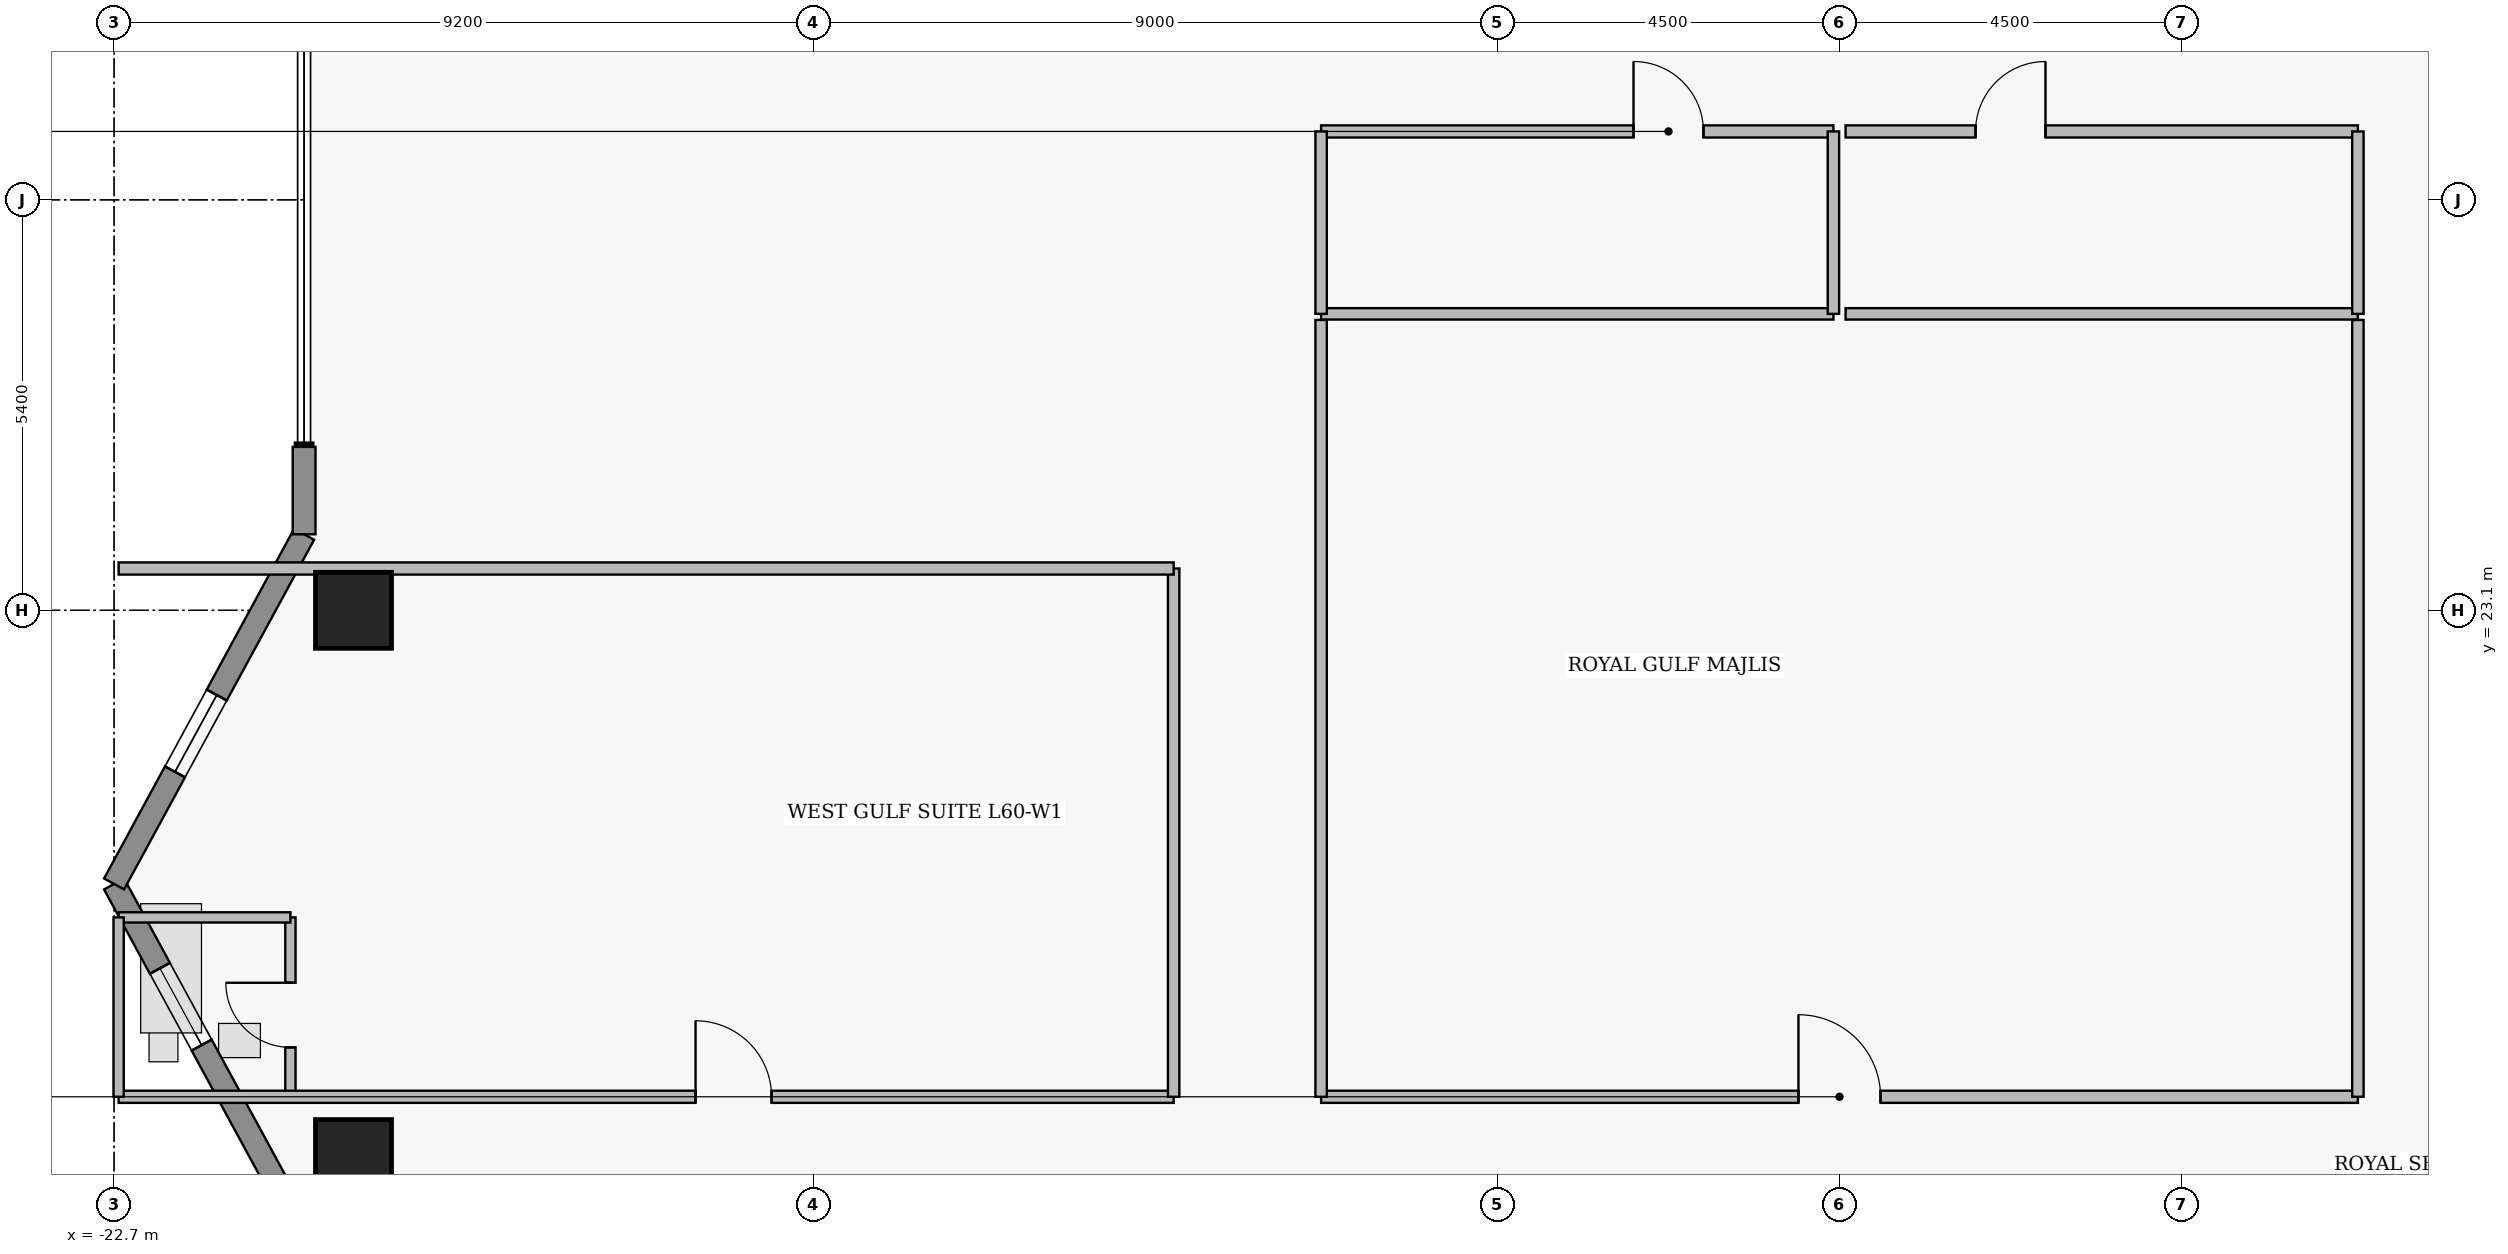
"""IFC4 building model, lengths in metres.
Left out: names, types, materials, properties, quantities, classifications, styles, units other than length and angle.
Written with IfcOpenShell. Run it as: python <this file> out.ifc"""

import sys

from ifc_helpers import new_model, si_unit, direction, frame, frame_2d, origin, origin_2d, place, context, subcontext, project, spatial, rectangle, extrude, element, fill, save


model = new_model("IFC4")
c1 = context("Model", 3, precision=1e-05, world=origin(), true_north=direction((0.0, 1.0)))
c2 = subcontext(c1, "Body", "Model", "MODEL_VIEW")
j1 = project(units=[si_unit("LENGTHUNIT", "METRE"), si_unit("PLANEANGLEUNIT", "RADIAN")], contexts=[c1])
p1 = place(None, origin())
s1 = spatial("IfcSite", under=j1, at=p1, CompositionType="ELEMENT")
p2 = place(p1, origin())
s2 = spatial("IfcBuilding", under=s1, at=p2, CompositionType="ELEMENT")
p3 = place(p2, frame((0.0, 0.0, 239.65)))
s3 = spatial("IfcBuildingStorey", under=s2, at=p3, CompositionType="ELEMENT", Elevation=239.65)
for number, where, z_axis, x_axis in (
    (1, (-19.55, 15.9, 0.43), (0.0, 0.0, 1.0), (1.0, 0.0, 0.0)),
    (2, (-19.55, 23.1, 0.43), (0.0, 0.0, 1.0), (1.0, 0.0, 0.0)),
):
    element("IfcColumn", number, at=place(p3, frame(where, z_axis=z_axis, x_axis=x_axis)), inside=s3, PredefinedType="COLUMN", context=c2, shape_type="SweptSolid", body=[
        extrude(rectangle(XDim=1.0, YDim=1.0, at=origin_2d()), origin(), (0.0, 0.0, 1.0), 3.27),
    ])
p4 = place(p3, frame((-20.2, 14.9, 0.0), z_axis=(0.0, 0.0, 1.0), x_axis=(-0.477505494629, 0.878628762675, 0.0)))
e3 = element("IfcWall", 3, at=p4, inside=s3, PredefinedType="STANDARD", context=c2, shape_type="SweptSolid", body=[
    extrude(rectangle(XDim=5.236, YDim=0.3, at=frame_2d((2.618, 0.0))), origin(), (0.0, 0.0, 1.0), 3.48),
])
p5 = place(p4, frame((2.823, 0.0, 1.25)))
e4 = element("IfcOpeningElement", 4, at=p5, cuts=e3, PredefinedType="OPENING", context=c2, shape_type="SweptSolid", body=[
    extrude(rectangle(XDim=1.15, YDim=1.55, at=frame_2d((0.575, 0.775))), frame((0.0, 0.16, 0.0), z_axis=(0.0, -1.0, 0.0), x_axis=(1.0, 0.0, 0.0)), (0.0, 0.0, 1.0), 0.32),
])
p6 = place(p3, frame((-22.7, 19.5, 0.0), z_axis=(0.0, 0.0, 1.0), x_axis=(0.477505494629, 0.878628762675, 0.0)))
e5 = element("IfcWall", 5, at=p6, inside=s3, PredefinedType="STANDARD", context=c2, shape_type="SweptSolid", body=[
    extrude(rectangle(XDim=5.236, YDim=0.3, at=frame_2d((2.618, 0.0))), origin(), (0.0, 0.0, 1.0), 3.48),
])
p7 = place(p6, frame((1.679, 0.0, 1.25)))
e6 = element("IfcOpeningElement", 6, at=p7, cuts=e5, PredefinedType="OPENING", context=c2, shape_type="SweptSolid", body=[
    extrude(rectangle(XDim=1.15, YDim=1.55, at=frame_2d((0.575, 0.775))), frame((0.0, 0.16, 0.0), z_axis=(0.0, -1.0, 0.0), x_axis=(1.0, 0.0, 0.0)), (0.0, 0.0, 1.0), 0.32),
])
p8 = place(p3, frame((-20.2, 24.1, 0.0), z_axis=(0.0, 0.0, 1.0), x_axis=(0.0, 1.0, 0.0)))
e7 = element("IfcWall", 7, at=p8, inside=s3, PredefinedType="STANDARD", context=c2, shape_type="SweptSolid", body=[
    extrude(rectangle(XDim=1.15, YDim=0.3, at=frame_2d((0.575, 0.0))), origin(), (0.0, 0.0, 1.0), 3.48),
])
p9 = place(p3, frame((-6.82, 29.4, 0.0), z_axis=(0.0, 0.0, 1.0), x_axis=(1.0, 0.0, 0.0)))
e8 = element("IfcWall", 8, at=p9, inside=s3, PredefinedType="PARTITIONING", context=c2, shape_type="SweptSolid", body=[
    extrude(rectangle(XDim=6.74, YDim=0.16, at=frame_2d((3.37, 0.0))), origin(), (0.0, 0.0, 1.0), 3.48),
])
p10 = place(p9, frame((4.11, 0.0, 0.0)))
e9 = element("IfcOpeningElement", 9, at=p10, cuts=e8, PredefinedType="OPENING", context=c2, shape_type="SweptSolid", body=[
    extrude(rectangle(XDim=0.92, YDim=2.12, at=frame_2d((0.46, 1.06))), frame((0.0, 0.09, 0.0), z_axis=(0.0, -1.0, 0.0), x_axis=(1.0, 0.0, 0.0)), (0.0, 0.0, 1.0), 0.18),
])
p11 = place(p3, frame((0.08, 29.4, 0.0), z_axis=(0.0, 0.0, 1.0), x_axis=(1.0, 0.0, 0.0)))
e10 = element("IfcWall", 10, at=p11, inside=s3, PredefinedType="PARTITIONING", context=c2, shape_type="SweptSolid", body=[
    extrude(rectangle(XDim=6.74, YDim=0.16, at=frame_2d((3.37, 0.0))), origin(), (0.0, 0.0, 1.0), 3.48),
])
p12 = place(p11, frame((1.71, 0.0, 0.0)))
e11 = element("IfcOpeningElement", 11, at=p12, cuts=e10, PredefinedType="OPENING", context=c2, shape_type="SweptSolid", body=[
    extrude(rectangle(XDim=0.92, YDim=2.12, at=frame_2d((0.46, 1.06))), frame((0.0, 0.09, 0.0), z_axis=(0.0, -1.0, 0.0), x_axis=(1.0, 0.0, 0.0)), (0.0, 0.0, 1.0), 0.18),
])
p13 = place(p3, frame((-6.82, 16.7, 0.0), z_axis=(0.0, 0.0, 1.0), x_axis=(1.0, 0.0, 0.0)))
e12 = element("IfcWall", 12, at=p13, inside=s3, PredefinedType="PARTITIONING", context=c2, shape_type="SweptSolid", body=[
    extrude(rectangle(XDim=13.64, YDim=0.16, at=frame_2d((6.82, 0.0))), origin(), (0.0, 0.0, 1.0), 3.076),
])
p14 = place(p13, frame((6.28, 0.0, 0.0)))
e13 = element("IfcOpeningElement", 13, at=p14, cuts=e12, PredefinedType="OPENING", context=c2, shape_type="SweptSolid", body=[
    extrude(rectangle(XDim=1.08, YDim=2.18, at=frame_2d((0.54, 1.09))), frame((0.0, 0.09, 0.0), z_axis=(0.0, -1.0, 0.0), x_axis=(1.0, 0.0, 0.0)), (0.0, 0.0, 1.0), 0.18),
])
p15 = place(p3, frame((-20.38, 16.7, 0.0), z_axis=(0.0, 0.0, 1.0), x_axis=(0.0, 1.0, 0.0)))
e14 = element("IfcWall", 14, at=p15, inside=s3, PredefinedType="PLUMBINGWALL", context=c2, shape_type="SweptSolid", body=[
    extrude(rectangle(XDim=2.36, YDim=0.135, at=frame_2d((1.18, 0.0))), origin(), (0.0, 0.0, 1.0), 3.48),
])
p16 = place(p15, frame((0.65, 0.0, 0.0)))
e15 = element("IfcOpeningElement", 15, at=p16, cuts=e14, PredefinedType="OPENING", context=c2, shape_type="SweptSolid", body=[
    extrude(rectangle(XDim=0.85, YDim=2.1, at=frame_2d((0.425, 1.05))), frame((0.0, 0.077, 0.0), z_axis=(0.0, -1.0, 0.0), x_axis=(1.0, 0.0, 0.0)), (0.0, 0.0, 1.0), 0.155),
])
p17 = place(p3, frame((-22.64, 16.7, 0.0), z_axis=(0.0, 0.0, 1.0), x_axis=(1.0, 0.0, 0.0)))
e16 = element("IfcWall", 16, at=p17, inside=s3, PredefinedType="PARTITIONING", context=c2, shape_type="SweptSolid", body=[
    extrude(rectangle(XDim=13.88, YDim=0.16, at=frame_2d((6.94, 0.0))), origin(), (0.0, 0.0, 1.0), 3.076),
])
p18 = place(p17, frame((7.59, 0.0, 0.0)))
e17 = element("IfcOpeningElement", 17, at=p18, cuts=e16, PredefinedType="OPENING", context=c2, shape_type="SweptSolid", body=[
    extrude(rectangle(XDim=1.0, YDim=2.15, at=frame_2d((0.5, 1.075))), frame((0.0, 0.09, 0.0), z_axis=(0.0, -1.0, 0.0), x_axis=(1.0, 0.0, 0.0)), (0.0, 0.0, 1.0), 0.18),
])
p19 = place(p3, frame((-6.82, 27.0, 0.0), z_axis=(0.0, 0.0, 1.0), x_axis=(1.0, 0.0, 0.0)))
e18 = element("IfcWall", 18, at=p19, inside=s3, PredefinedType="PARTITIONING", context=c2, shape_type="SweptSolid", body=[
    extrude(rectangle(XDim=6.74, YDim=0.15, at=frame_2d((3.37, 0.0))), origin(), (0.0, 0.0, 1.0), 3.48),
])
for number, where, z_axis, x_axis in (
    (19, (-6.82, 27.0, 0.0), (0.0, 0.0, 1.0), (0.0, 1.0, 0.0)),
    (20, (-0.08, 27.0, 0.0), (0.0, 0.0, 1.0), (0.0, 1.0, 0.0)),
):
    element("IfcWall", number, at=place(p3, frame(where, z_axis=z_axis, x_axis=x_axis)), inside=s3, PredefinedType="PARTITIONING", context=c2, shape_type="SweptSolid", body=[
        extrude(rectangle(XDim=2.4, YDim=0.15, at=frame_2d((1.2, 0.0))), origin(), (0.0, 0.0, 1.0), 3.48),
    ])
p20 = place(p3, frame((0.08, 27.0, 0.0), z_axis=(0.0, 0.0, 1.0), x_axis=(1.0, 0.0, 0.0)))
e21 = element("IfcWall", 21, at=p20, inside=s3, PredefinedType="PARTITIONING", context=c2, shape_type="SweptSolid", body=[
    extrude(rectangle(XDim=6.74, YDim=0.15, at=frame_2d((3.37, 0.0))), origin(), (0.0, 0.0, 1.0), 3.48),
])
p21 = place(p3, frame((6.82, 27.0, 0.0), z_axis=(0.0, 0.0, 1.0), x_axis=(0.0, 1.0, 0.0)))
e22 = element("IfcWall", 22, at=p21, inside=s3, PredefinedType="PARTITIONING", context=c2, shape_type="SweptSolid", body=[
    extrude(rectangle(XDim=2.4, YDim=0.15, at=frame_2d((1.2, 0.0))), origin(), (0.0, 0.0, 1.0), 3.48),
])
for number, where, z_axis, x_axis in (
    (23, (-6.82, 16.7, 0.0), (0.0, 0.0, 1.0), (0.0, 1.0, 0.0)),
    (24, (6.82, 16.7, 0.0), (0.0, 0.0, 1.0), (0.0, 1.0, 0.0)),
):
    element("IfcWall", number, at=place(p3, frame(where, z_axis=z_axis, x_axis=x_axis)), inside=s3, PredefinedType="PARTITIONING", context=c2, shape_type="SweptSolid", body=[
        extrude(rectangle(XDim=10.22, YDim=0.15, at=frame_2d((5.11, 0.0))), origin(), (0.0, 0.0, 1.0), 3.48),
    ])
p22 = place(p3, frame((-22.64, 19.06, 0.0), z_axis=(0.0, 0.0, 1.0), x_axis=(1.0, 0.0, 0.0)))
e25 = element("IfcWall", 25, at=p22, inside=s3, PredefinedType="PLUMBINGWALL", context=c2, shape_type="SweptSolid", body=[
    extrude(rectangle(XDim=2.26, YDim=0.135, at=frame_2d((1.13, 0.0))), origin(), (0.0, 0.0, 1.0), 3.48),
])
p23 = place(p3, frame((-22.64, 16.7, 0.0), z_axis=(0.0, 0.0, 1.0), x_axis=(0.0, 1.0, 0.0)))
e26 = element("IfcWall", 26, at=p23, inside=s3, PredefinedType="PLUMBINGWALL", context=c2, shape_type="SweptSolid", body=[
    extrude(rectangle(XDim=2.36, YDim=0.135, at=frame_2d((1.18, 0.0))), origin(), (0.0, 0.0, 1.0), 3.48),
])
p24 = place(p3, frame((-8.76, 16.7, 0.0), z_axis=(0.0, 0.0, 1.0), x_axis=(0.0, 1.0, 0.0)))
e27 = element("IfcWall", 27, at=p24, inside=s3, PredefinedType="PARTITIONING", context=c2, shape_type="SweptSolid", body=[
    extrude(rectangle(XDim=6.95, YDim=0.15, at=frame_2d((3.475, 0.0))), origin(), (0.0, 0.0, 1.0), 3.48),
])
p25 = place(p3, frame((-22.64, 23.65, 0.0), z_axis=(0.0, 0.0, 1.0), x_axis=(1.0, 0.0, 0.0)))
e28 = element("IfcWall", 28, at=p25, inside=s3, PredefinedType="PARTITIONING", context=c2, shape_type="SweptSolid", body=[
    extrude(rectangle(XDim=13.88, YDim=0.16, at=frame_2d((6.94, 0.0))), origin(), (0.0, 0.0, 1.0), 3.48),
])
p26 = place(p5, origin())
e29 = element("IfcWindow", 29, at=p26, inside=s3, PartitioningType="SINGLE_PANEL", PredefinedType="WINDOW", context=c2, shape_type="SweptSolid", body=[
    extrude(rectangle(XDim=1.15, YDim=1.55, at=frame_2d((0.575, 0.775))), frame((0.0, 0.03, 0.0), z_axis=(0.0, -1.0, 0.0), x_axis=(1.0, 0.0, 0.0)), (0.0, 0.0, 1.0), 0.06),
])
fill(e4, e29)
p27 = place(p7, origin())
e30 = element("IfcWindow", 30, at=p27, inside=s3, PartitioningType="SINGLE_PANEL", PredefinedType="WINDOW", context=c2, shape_type="SweptSolid", body=[
    extrude(rectangle(XDim=1.15, YDim=1.55, at=frame_2d((0.575, 0.775))), frame((0.0, 0.03, 0.0), z_axis=(0.0, -1.0, 0.0), x_axis=(1.0, 0.0, 0.0)), (0.0, 0.0, 1.0), 0.06),
])
fill(e6, e30)
p28 = place(p10, origin())
e31 = element("IfcDoor", 31, at=p28, inside=s3, OperationType="SINGLE_SWING_LEFT", PredefinedType="DOOR", context=c2, shape_type="SweptSolid", body=[
    extrude(rectangle(XDim=0.92, YDim=2.12, at=frame_2d((0.46, 1.06))), frame((0.0, 0.025, 0.0), z_axis=(0.0, -1.0, 0.0), x_axis=(1.0, 0.0, 0.0)), (0.0, 0.0, 1.0), 0.05),
])
fill(e9, e31)
p29 = place(p12, origin())
e32 = element("IfcDoor", 32, at=p29, inside=s3, OperationType="SINGLE_SWING_RIGHT", PredefinedType="DOOR", context=c2, shape_type="SweptSolid", body=[
    extrude(rectangle(XDim=0.92, YDim=2.12, at=frame_2d((0.46, 1.06))), frame((0.0, 0.025, 0.0), z_axis=(0.0, -1.0, 0.0), x_axis=(1.0, 0.0, 0.0)), (0.0, 0.0, 1.0), 0.05),
])
fill(e11, e32)
p30 = place(p14, origin())
e33 = element("IfcDoor", 33, at=p30, inside=s3, OperationType="SINGLE_SWING_LEFT", PredefinedType="DOOR", context=c2, shape_type="SweptSolid", body=[
    extrude(rectangle(XDim=1.08, YDim=2.18, at=frame_2d((0.54, 1.09))), frame((0.0, 0.025, 0.0), z_axis=(0.0, -1.0, 0.0), x_axis=(1.0, 0.0, 0.0)), (0.0, 0.0, 1.0), 0.05),
])
fill(e13, e33)
p31 = place(p16, origin())
e34 = element("IfcDoor", 34, at=p31, inside=s3, OperationType="SINGLE_SWING_RIGHT", PredefinedType="DOOR", context=c2, shape_type="SweptSolid", body=[
    extrude(rectangle(XDim=0.85, YDim=2.1, at=frame_2d((0.425, 1.05))), frame((0.0, 0.025, 0.0), z_axis=(0.0, -1.0, 0.0), x_axis=(1.0, 0.0, 0.0)), (0.0, 0.0, 1.0), 0.05),
])
fill(e15, e34)
p32 = place(p18, origin())
e35 = element("IfcDoor", 35, at=p32, inside=s3, OperationType="SINGLE_SWING_LEFT", PredefinedType="DOOR", context=c2, shape_type="SweptSolid", body=[
    extrude(rectangle(XDim=1.0, YDim=2.15, at=frame_2d((0.5, 1.075))), frame((0.0, 0.025, 0.0), z_axis=(0.0, -1.0, 0.0), x_axis=(1.0, 0.0, 0.0)), (0.0, 0.0, 1.0), 0.05),
])
fill(e17, e35)
save(model, sys.argv[1])
